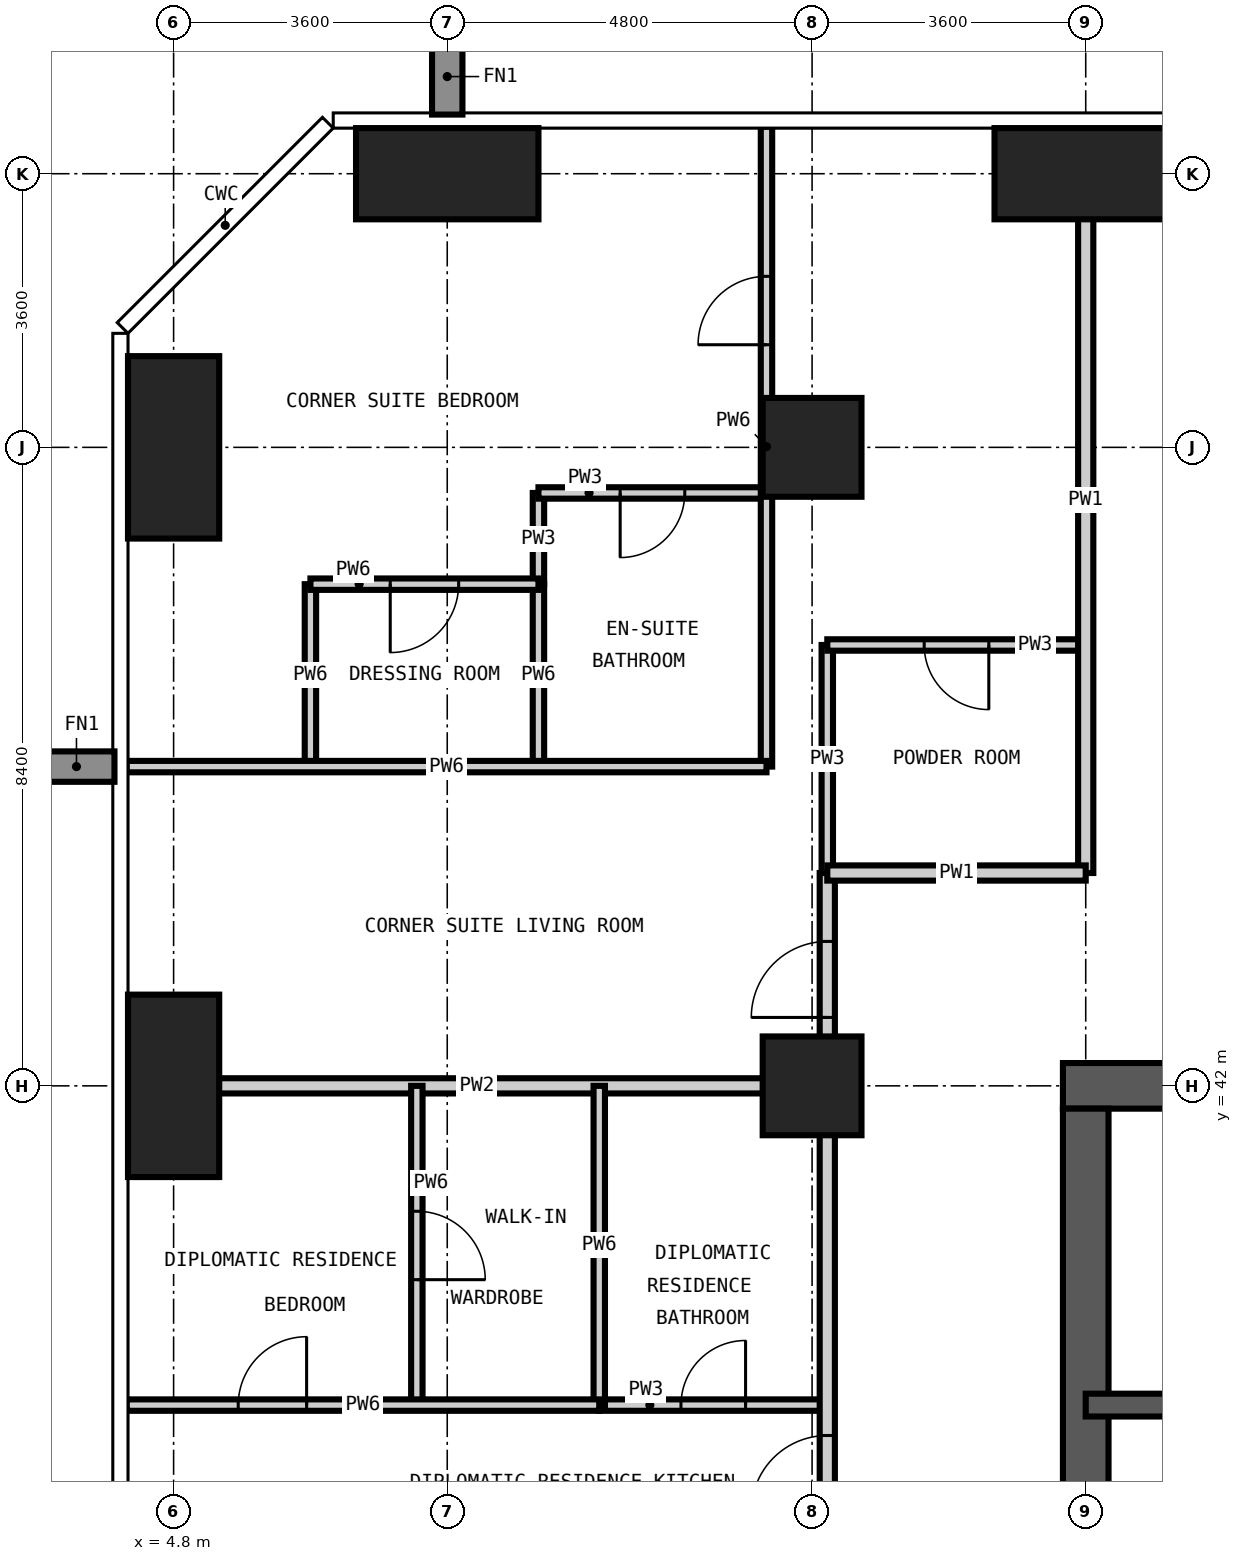
"""IFC4 building model, lengths in metres.
Left out: names, types, materials, properties, quantities, classifications, styles, units other than length and angle.
Written with IfcOpenShell. Run it as: python <this file> out.ifc"""

import sys

from ifc_helpers import new_model, si_unit, direction, frame, frame_2d, origin, origin_2d, place, context, subcontext, project, spatial, rectangle, extrude, element, fill, save


model = new_model("IFC4")
c1 = context("Model", 3, precision=1e-05, world=origin(), true_north=direction((0.0, 1.0)))
c2 = subcontext(c1, "Body", "Model", "MODEL_VIEW")
j1 = project(units=[si_unit("LENGTHUNIT", "METRE"), si_unit("PLANEANGLEUNIT", "RADIAN")], contexts=[c1])
p1 = place(None, origin())
s1 = spatial("IfcSite", under=j1, at=p1, CompositionType="ELEMENT")
p2 = place(p1, origin())
s2 = spatial("IfcBuilding", under=s1, at=p2, CompositionType="ELEMENT")
p3 = place(p2, frame((0.0, 0.0, 198.6)))
s3 = spatial("IfcBuildingStorey", under=s2, at=p3, CompositionType="ELEMENT", Elevation=198.6)
for number, where, z_axis, x_axis in (
    (1, (4.8, 42.0, -0.35), (0.0, 0.0, 1.0), (1.0, 0.0, 0.0)),
    (2, (4.8, 50.4, -0.35), (0.0, 0.0, 1.0), (1.0, 0.0, 0.0)),
):
    element("IfcColumn", number, at=place(p3, frame(where, z_axis=z_axis, x_axis=x_axis)), inside=s3, PredefinedType="COLUMN", context=c2, shape_type="SweptSolid", body=[
        extrude(rectangle(XDim=1.2, YDim=2.4, at=origin_2d()), origin(), (0.0, 0.0, 1.0), 3.6),
    ])
p4 = place(p3, frame((8.4, 54.0, -0.35), z_axis=(0.0, 0.0, 1.0), x_axis=(1.0, 0.0, 0.0)))
e3 = element("IfcColumn", 3, at=p4, inside=s3, PredefinedType="COLUMN", context=c2, shape_type="SweptSolid", body=[
    extrude(rectangle(XDim=2.4, YDim=1.2, at=origin_2d()), origin(), (0.0, 0.0, 1.0), 3.6),
])
for number, where, z_axis, x_axis in (
    (4, (13.2, 42.0, -0.35), (0.0, 0.0, 1.0), (1.0, 0.0, 0.0)),
    (5, (13.2, 50.4, -0.35), (0.0, 0.0, 1.0), (1.0, 0.0, 0.0)),
):
    element("IfcColumn", number, at=place(p3, frame(where, z_axis=z_axis, x_axis=x_axis)), inside=s3, PredefinedType="COLUMN", context=c2, shape_type="SweptSolid", body=[
        extrude(rectangle(XDim=1.3, YDim=1.3, at=origin_2d()), origin(), (0.0, 0.0, 1.0), 3.6),
    ])
p5 = place(p3, frame((16.8, 54.0, -0.35), z_axis=(0.0, 0.0, 1.0), x_axis=(1.0, 0.0, 0.0)))
e6 = element("IfcColumn", 6, at=p5, inside=s3, PredefinedType="COLUMN", context=c2, shape_type="SweptSolid", body=[
    extrude(rectangle(XDim=2.4, YDim=1.2, at=origin_2d()), origin(), (0.0, 0.0, 1.0), 3.6),
])
p6 = place(p3, frame((42.3, 42.0, -0.35), z_axis=(0.0, 0.0, 1.0), x_axis=(-1.0, 0.0, 0.0)))
e7 = element("IfcWall", 7, at=p6, inside=s3, PredefinedType="SHEAR", context=c2, shape_type="SweptSolid", body=[
    extrude(rectangle(XDim=25.8, YDim=0.6, at=frame_2d((12.9, 0.0))), origin(), (0.0, 0.0, 1.0), 3.6),
])
p7 = place(p6, frame((20.8, 0.0, 0.35)))
e8 = element("IfcOpeningElement", 8, at=p7, cuts=e7, PredefinedType="OPENING", context=c2, shape_type="SweptSolid", body=[
    extrude(rectangle(XDim=1.0, YDim=2.1, at=frame_2d((0.5, 1.05))), frame((0.0, 0.31, 0.0), z_axis=(0.0, -1.0, 0.0), x_axis=(1.0, 0.0, 0.0)), (0.0, 0.0, 1.0), 0.62),
])
p8 = place(p6, frame((10.2, 0.0, 0.35)))
e9 = element("IfcOpeningElement", 9, at=p8, cuts=e7, PredefinedType="OPENING", context=c2, shape_type="SweptSolid", body=[
    extrude(rectangle(XDim=1.2, YDim=2.2, at=frame_2d((0.6, 1.1))), frame((0.0, 0.31, 0.0), z_axis=(0.0, -1.0, 0.0), x_axis=(1.0, 0.0, 0.0)), (0.0, 0.0, 1.0), 0.62),
])
p9 = place(p3, frame((16.8, 41.7, -0.35), z_axis=(0.0, 0.0, 1.0), x_axis=(0.0, -1.0, 0.0)))
e10 = element("IfcWall", 10, at=p9, inside=s3, PredefinedType="SHEAR", context=c2, shape_type="SweptSolid", body=[
    extrude(rectangle(XDim=24.6, YDim=0.6, at=frame_2d((12.3, 0.0))), origin(), (0.0, 0.0, 1.0), 3.6),
])
p10 = place(p9, frame((11.4, 0.0, 0.35)))
e11 = element("IfcOpeningElement", 11, at=p10, cuts=e10, PredefinedType="OPENING", context=c2, shape_type="SweptSolid", body=[
    extrude(rectangle(XDim=1.8, YDim=2.2, at=frame_2d((0.9, 1.1))), frame((0.0, 0.31, 0.0), z_axis=(0.0, -1.0, 0.0), x_axis=(1.0, 0.0, 0.0)), (0.0, 0.0, 1.0), 0.62),
])
p11 = place(p9, frame((20.2, 0.0, 0.35)))
e12 = element("IfcOpeningElement", 12, at=p11, cuts=e10, PredefinedType="OPENING", context=c2, shape_type="SweptSolid", body=[
    extrude(rectangle(XDim=1.0, YDim=2.1, at=frame_2d((0.5, 1.05))), frame((0.0, 0.31, 0.0), z_axis=(0.0, -1.0, 0.0), x_axis=(1.0, 0.0, 0.0)), (0.0, 0.0, 1.0), 0.62),
])
p12 = place(p9, frame((5.5, 0.0, 0.35)))
e13 = element("IfcOpeningElement", 13, at=p12, cuts=e10, PredefinedType="OPENING", context=c2, shape_type="SweptSolid", body=[
    extrude(rectangle(XDim=1.0, YDim=2.1, at=frame_2d((0.5, 1.05))), frame((0.0, 0.31, 0.0), z_axis=(0.0, -1.0, 0.0), x_axis=(1.0, 0.0, 0.0)), (0.0, 0.0, 1.0), 0.62),
])
p13 = place(p3, frame((16.8, 37.8, -0.35), z_axis=(0.0, 0.0, 1.0), x_axis=(1.0, 0.0, 0.0)))
e14 = element("IfcWall", 14, at=p13, inside=s3, PredefinedType="SHEAR", context=c2, shape_type="SweptSolid", body=[
    extrude(rectangle(XDim=8.4, YDim=0.3, at=frame_2d((4.2, 0.0))), origin(), (0.0, 0.0, 1.0), 3.6),
])
p14 = place(p3, frame((9.6, 48.6, 0.0), z_axis=(0.0, 0.0, 1.0), x_axis=(0.0, 1.0, 0.0)))
e15 = element("IfcWall", 15, at=p14, inside=s3, PredefinedType="PARTITIONING", context=c2, shape_type="SweptSolid", body=[
    extrude(rectangle(XDim=1.2, YDim=0.15, at=frame_2d((0.6, 0.0))), origin(), (0.0, 0.0, 1.0), 3.25),
])
p15 = place(p3, frame((13.4, 44.8, 0.0), z_axis=(0.0, 0.0, 1.0), x_axis=(0.0, 1.0, 0.0)))
e16 = element("IfcWall", 16, at=p15, inside=s3, PredefinedType="PARTITIONING", context=c2, shape_type="SweptSolid", body=[
    extrude(rectangle(XDim=3.0, YDim=0.15, at=frame_2d((1.5, 0.0))), origin(), (0.0, 0.0, 1.0), 3.25),
])
p16 = place(p3, frame((10.4, 37.8, 0.0), z_axis=(0.0, 0.0, 1.0), x_axis=(1.0, 0.0, 0.0)))
e17 = element("IfcWall", 17, at=p16, inside=s3, PredefinedType="PARTITIONING", context=c2, shape_type="SweptSolid", body=[
    extrude(rectangle(XDim=3.0, YDim=0.15, at=frame_2d((1.5, 0.0))), origin(), (0.0, 0.0, 1.0), 3.25),
])
p17 = place(p16, frame((1.075, 0.0, 0.0)))
e18 = element("IfcOpeningElement", 18, at=p17, cuts=e17, PredefinedType="OPENING", context=c2, shape_type="SweptSolid", body=[
    extrude(rectangle(XDim=0.85, YDim=2.1, at=frame_2d((0.425, 1.05))), frame((0.0, 0.085, 0.0), z_axis=(0.0, -1.0, 0.0), x_axis=(1.0, 0.0, 0.0)), (0.0, 0.0, 1.0), 0.17),
])
p18 = place(p3, frame((13.4, 47.8, 0.0), z_axis=(0.0, 0.0, 1.0), x_axis=(1.0, 0.0, 0.0)))
e19 = element("IfcWall", 19, at=p18, inside=s3, PredefinedType="PARTITIONING", context=c2, shape_type="SweptSolid", body=[
    extrude(rectangle(XDim=3.4, YDim=0.15, at=frame_2d((1.7, 0.0))), origin(), (0.0, 0.0, 1.0), 3.25),
])
p19 = place(p18, frame((1.275, 0.0, 0.0)))
e20 = element("IfcOpeningElement", 20, at=p19, cuts=e19, PredefinedType="OPENING", context=c2, shape_type="SweptSolid", body=[
    extrude(rectangle(XDim=0.85, YDim=2.1, at=frame_2d((0.425, 1.05))), frame((0.0, 0.085, 0.0), z_axis=(0.0, -1.0, 0.0), x_axis=(1.0, 0.0, 0.0)), (0.0, 0.0, 1.0), 0.17),
])
p20 = place(p3, frame((9.6, 49.8, 0.0), z_axis=(0.0, 0.0, 1.0), x_axis=(1.0, 0.0, 0.0)))
e21 = element("IfcWall", 21, at=p20, inside=s3, PredefinedType="PARTITIONING", context=c2, shape_type="SweptSolid", body=[
    extrude(rectangle(XDim=3.0, YDim=0.15, at=frame_2d((1.5, 0.0))), origin(), (0.0, 0.0, 1.0), 3.25),
])
p21 = place(p20, frame((1.075, 0.0, 0.0)))
e22 = element("IfcOpeningElement", 22, at=p21, cuts=e21, PredefinedType="OPENING", context=c2, shape_type="SweptSolid", body=[
    extrude(rectangle(XDim=0.85, YDim=2.1, at=frame_2d((0.425, 1.05))), frame((0.0, 0.085, 0.0), z_axis=(0.0, -1.0, 0.0), x_axis=(1.0, 0.0, 0.0)), (0.0, 0.0, 1.0), 0.17),
])
p22 = place(p3, frame((13.4, 13.4, 0.0), z_axis=(0.0, 0.0, 1.0), x_axis=(0.0, 1.0, 0.0)))
e23 = element("IfcWall", 23, at=p22, inside=s3, PredefinedType="PARTITIONING", context=c2, shape_type="SweptSolid", body=[
    extrude(rectangle(XDim=31.4, YDim=0.2, at=frame_2d((15.7, 0.0))), origin(), (0.0, 0.0, 1.0), 3.25),
])
p23 = place(p22, frame((6.2, 0.0, 0.0)))
e24 = element("IfcOpeningElement", 24, at=p23, cuts=e23, PredefinedType="OPENING", context=c2, shape_type="SweptSolid", body=[
    extrude(rectangle(XDim=1.0, YDim=2.2, at=frame_2d((0.5, 1.1))), frame((0.0, 0.11, 0.0), z_axis=(0.0, -1.0, 0.0), x_axis=(1.0, 0.0, 0.0)), (0.0, 0.0, 1.0), 0.22),
])
p24 = place(p22, frame((14.6, 0.0, 0.0)))
e25 = element("IfcOpeningElement", 25, at=p24, cuts=e23, PredefinedType="OPENING", context=c2, shape_type="SweptSolid", body=[
    extrude(rectangle(XDim=1.0, YDim=2.2, at=frame_2d((0.5, 1.1))), frame((0.0, 0.11, 0.0), z_axis=(0.0, -1.0, 0.0), x_axis=(1.0, 0.0, 0.0)), (0.0, 0.0, 1.0), 0.22),
])
p25 = place(p22, frame((23.0, 0.0, 0.0)))
e26 = element("IfcOpeningElement", 26, at=p25, cuts=e23, PredefinedType="OPENING", context=c2, shape_type="SweptSolid", body=[
    extrude(rectangle(XDim=1.0, YDim=2.2, at=frame_2d((0.5, 1.1))), frame((0.0, 0.11, 0.0), z_axis=(0.0, -1.0, 0.0), x_axis=(1.0, 0.0, 0.0)), (0.0, 0.0, 1.0), 0.22),
])
p26 = place(p22, frame((1.2, 0.0, 0.0)))
e27 = element("IfcOpeningElement", 27, at=p26, cuts=e23, PredefinedType="OPENING", context=c2, shape_type="SweptSolid", body=[
    extrude(rectangle(XDim=1.0, YDim=2.2, at=frame_2d((0.5, 1.1))), frame((0.0, 0.11, 0.0), z_axis=(0.0, -1.0, 0.0), x_axis=(1.0, 0.0, 0.0)), (0.0, 0.0, 1.0), 0.22),
])
p27 = place(p22, frame((29.5, 0.0, 0.0)))
e28 = element("IfcOpeningElement", 28, at=p27, cuts=e23, PredefinedType="OPENING", context=c2, shape_type="SweptSolid", body=[
    extrude(rectangle(XDim=1.0, YDim=2.2, at=frame_2d((0.5, 1.1))), frame((0.0, 0.11, 0.0), z_axis=(0.0, -1.0, 0.0), x_axis=(1.0, 0.0, 0.0)), (0.0, 0.0, 1.0), 0.22),
])
p28 = place(p3, frame((16.8, 44.8, 0.0), z_axis=(0.0, 0.0, 1.0), x_axis=(0.0, 1.0, 0.0)))
e29 = element("IfcWall", 29, at=p28, inside=s3, PredefinedType="PARTITIONING", context=c2, shape_type="SweptSolid", body=[
    extrude(rectangle(XDim=9.818, YDim=0.2, at=frame_2d((4.909, 0.0))), origin(), (0.0, 0.0, 1.0), 3.25),
])
p29 = place(p3, frame((13.4, 44.8, 0.0), z_axis=(0.0, 0.0, 1.0), x_axis=(1.0, 0.0, 0.0)))
e30 = element("IfcWall", 30, at=p29, inside=s3, PredefinedType="PARTITIONING", context=c2, shape_type="SweptSolid", body=[
    extrude(rectangle(XDim=3.4, YDim=0.2, at=frame_2d((1.7, 0.0))), origin(), (0.0, 0.0, 1.0), 3.25),
])
p30 = place(p3, frame((4.182, 42.0, 0.0), z_axis=(0.0, 0.0, 1.0), x_axis=(1.0, 0.0, 0.0)))
e31 = element("IfcWall", 31, at=p30, inside=s3, PredefinedType="PARTITIONING", context=c2, shape_type="SweptSolid", body=[
    extrude(rectangle(XDim=9.218, YDim=0.2, at=frame_2d((4.609, 0.0))), origin(), (0.0, 0.0, 1.0), 3.25),
])
p31 = place(p3, frame((6.6, 46.2, 0.0), z_axis=(0.0, 0.0, 1.0), x_axis=(0.0, 1.0, 0.0)))
e32 = element("IfcWall", 32, at=p31, inside=s3, PredefinedType="PARTITIONING", context=c2, shape_type="SweptSolid", body=[
    extrude(rectangle(XDim=2.4, YDim=0.15, at=frame_2d((1.2, 0.0))), origin(), (0.0, 0.0, 1.0), 3.25),
])
p32 = place(p3, frame((8.0, 37.8, 0.0), z_axis=(0.0, 0.0, 1.0), x_axis=(0.0, 1.0, 0.0)))
e33 = element("IfcWall", 33, at=p32, inside=s3, PredefinedType="PARTITIONING", context=c2, shape_type="SweptSolid", body=[
    extrude(rectangle(XDim=4.2, YDim=0.15, at=frame_2d((2.1, 0.0))), origin(), (0.0, 0.0, 1.0), 3.25),
])
p33 = place(p32, frame((1.65, 0.0, 0.0)))
e34 = element("IfcOpeningElement", 34, at=p33, cuts=e33, PredefinedType="OPENING", context=c2, shape_type="SweptSolid", body=[
    extrude(rectangle(XDim=0.9, YDim=2.1, at=frame_2d((0.45, 1.05))), frame((0.0, 0.085, 0.0), z_axis=(0.0, -1.0, 0.0), x_axis=(1.0, 0.0, 0.0)), (0.0, 0.0, 1.0), 0.17),
])
p34 = place(p3, frame((9.6, 46.2, 0.0), z_axis=(0.0, 0.0, 1.0), x_axis=(0.0, 1.0, 0.0)))
e35 = element("IfcWall", 35, at=p34, inside=s3, PredefinedType="PARTITIONING", context=c2, shape_type="SweptSolid", body=[
    extrude(rectangle(XDim=2.4, YDim=0.15, at=frame_2d((1.2, 0.0))), origin(), (0.0, 0.0, 1.0), 3.25),
])
p35 = place(p3, frame((10.4, 37.8, 0.0), z_axis=(0.0, 0.0, 1.0), x_axis=(0.0, 1.0, 0.0)))
e36 = element("IfcWall", 36, at=p35, inside=s3, PredefinedType="PARTITIONING", context=c2, shape_type="SweptSolid", body=[
    extrude(rectangle(XDim=4.2, YDim=0.15, at=frame_2d((2.1, 0.0))), origin(), (0.0, 0.0, 1.0), 3.25),
])
p36 = place(p3, frame((12.6, 46.2, 0.0), z_axis=(0.0, 0.0, 1.0), x_axis=(0.0, 1.0, 0.0)))
e37 = element("IfcWall", 37, at=p36, inside=s3, PredefinedType="PARTITIONING", context=c2, shape_type="SweptSolid", body=[
    extrude(rectangle(XDim=8.418, YDim=0.15, at=frame_2d((4.209, 0.0))), origin(), (0.0, 0.0, 1.0), 3.25),
])
p37 = place(p36, frame((5.55, 0.0, 0.0)))
e38 = element("IfcOpeningElement", 38, at=p37, cuts=e37, PredefinedType="OPENING", context=c2, shape_type="SweptSolid", body=[
    extrude(rectangle(XDim=0.9, YDim=2.1, at=frame_2d((0.45, 1.05))), frame((0.0, 0.085, 0.0), z_axis=(0.0, -1.0, 0.0), x_axis=(1.0, 0.0, 0.0)), (0.0, 0.0, 1.0), 0.17),
])
p38 = place(p3, frame((4.182, 37.8, 0.0), z_axis=(0.0, 0.0, 1.0), x_axis=(1.0, 0.0, 0.0)))
e39 = element("IfcWall", 39, at=p38, inside=s3, PredefinedType="PARTITIONING", context=c2, shape_type="SweptSolid", body=[
    extrude(rectangle(XDim=6.218, YDim=0.15, at=frame_2d((3.109, 0.0))), origin(), (0.0, 0.0, 1.0), 3.25),
])
p39 = place(p38, frame((1.468, 0.0, 0.0)))
e40 = element("IfcOpeningElement", 40, at=p39, cuts=e39, PredefinedType="OPENING", context=c2, shape_type="SweptSolid", body=[
    extrude(rectangle(XDim=0.9, YDim=2.1, at=frame_2d((0.45, 1.05))), frame((0.0, 0.085, 0.0), z_axis=(0.0, -1.0, 0.0), x_axis=(1.0, 0.0, 0.0)), (0.0, 0.0, 1.0), 0.17),
])
p40 = place(p3, frame((4.182, 46.2, 0.0), z_axis=(0.0, 0.0, 1.0), x_axis=(1.0, 0.0, 0.0)))
e41 = element("IfcWall", 41, at=p40, inside=s3, PredefinedType="PARTITIONING", context=c2, shape_type="SweptSolid", body=[
    extrude(rectangle(XDim=8.418, YDim=0.15, at=frame_2d((4.209, 0.0))), origin(), (0.0, 0.0, 1.0), 3.25),
])
p41 = place(p3, frame((6.6, 48.6, 0.0), z_axis=(0.0, 0.0, 1.0), x_axis=(1.0, 0.0, 0.0)))
e42 = element("IfcWall", 42, at=p41, inside=s3, PredefinedType="PARTITIONING", context=c2, shape_type="SweptSolid", body=[
    extrude(rectangle(XDim=3.0, YDim=0.15, at=frame_2d((1.5, 0.0))), origin(), (0.0, 0.0, 1.0), 3.25),
])
p42 = place(p41, frame((1.05, 0.0, 0.0)))
e43 = element("IfcOpeningElement", 43, at=p42, cuts=e42, PredefinedType="OPENING", context=c2, shape_type="SweptSolid", body=[
    extrude(rectangle(XDim=0.9, YDim=2.1, at=frame_2d((0.45, 1.05))), frame((0.0, 0.085, 0.0), z_axis=(0.0, -1.0, 0.0), x_axis=(1.0, 0.0, 0.0)), (0.0, 0.0, 1.0), 0.17),
])
p43 = place(p25, origin())
e44 = element("IfcDoor", 44, at=p43, inside=s3, OperationType="SINGLE_SWING_LEFT", PredefinedType="DOOR", context=c2, shape_type="SweptSolid", body=[
    extrude(rectangle(XDim=1.0, YDim=2.2, at=frame_2d((0.5, 1.1))), frame((0.0, 0.025, 0.0), z_axis=(0.0, -1.0, 0.0), x_axis=(1.0, 0.0, 0.0)), (0.0, 0.0, 1.0), 0.05),
])
fill(e26, e44)
p44 = place(p17, origin())
e45 = element("IfcDoor", 45, at=p44, inside=s3, OperationType="SINGLE_SWING_RIGHT", PredefinedType="DOOR", context=c2, shape_type="SweptSolid", body=[
    extrude(rectangle(XDim=0.85, YDim=2.1, at=frame_2d((0.425, 1.05))), frame((0.0, 0.025, 0.0), z_axis=(0.0, -1.0, 0.0), x_axis=(1.0, 0.0, 0.0)), (0.0, 0.0, 1.0), 0.05),
])
fill(e18, e45)
p45 = place(p33, frame((0.9, 0.0, 0.0), z_axis=(0.0, 0.0, 1.0), x_axis=(-1.0, 0.0, 0.0)))
e46 = element("IfcDoor", 46, at=p45, inside=s3, OperationType="SINGLE_SWING_RIGHT", PredefinedType="DOOR", context=c2, shape_type="SweptSolid", body=[
    extrude(rectangle(XDim=0.9, YDim=2.1, at=frame_2d((0.45, 1.05))), frame((0.0, 0.025, 0.0), z_axis=(0.0, -1.0, 0.0), x_axis=(1.0, 0.0, 0.0)), (0.0, 0.0, 1.0), 0.05),
])
fill(e34, e46)
p46 = place(p39, origin())
e47 = element("IfcDoor", 47, at=p46, inside=s3, OperationType="SINGLE_SWING_RIGHT", PredefinedType="DOOR", context=c2, shape_type="SweptSolid", body=[
    extrude(rectangle(XDim=0.9, YDim=2.1, at=frame_2d((0.45, 1.05))), frame((0.0, 0.025, 0.0), z_axis=(0.0, -1.0, 0.0), x_axis=(1.0, 0.0, 0.0)), (0.0, 0.0, 1.0), 0.05),
])
fill(e40, e47)
p47 = place(p27, origin())
e48 = element("IfcDoor", 48, at=p47, inside=s3, OperationType="SINGLE_SWING_LEFT", PredefinedType="DOOR", context=c2, shape_type="SweptSolid", body=[
    extrude(rectangle(XDim=1.0, YDim=2.2, at=frame_2d((0.5, 1.1))), frame((0.0, 0.025, 0.0), z_axis=(0.0, -1.0, 0.0), x_axis=(1.0, 0.0, 0.0)), (0.0, 0.0, 1.0), 0.05),
])
fill(e28, e48)
p48 = place(p19, frame((0.85, 0.0, 0.0), z_axis=(0.0, 0.0, 1.0), x_axis=(-1.0, 0.0, 0.0)))
e49 = element("IfcDoor", 49, at=p48, inside=s3, OperationType="SINGLE_SWING_LEFT", PredefinedType="DOOR", context=c2, shape_type="SweptSolid", body=[
    extrude(rectangle(XDim=0.85, YDim=2.1, at=frame_2d((0.425, 1.05))), frame((0.0, 0.025, 0.0), z_axis=(0.0, -1.0, 0.0), x_axis=(1.0, 0.0, 0.0)), (0.0, 0.0, 1.0), 0.05),
])
fill(e20, e49)
p49 = place(p37, origin())
e50 = element("IfcDoor", 50, at=p49, inside=s3, OperationType="SINGLE_SWING_LEFT", PredefinedType="DOOR", context=c2, shape_type="SweptSolid", body=[
    extrude(rectangle(XDim=0.9, YDim=2.1, at=frame_2d((0.45, 1.05))), frame((0.0, 0.025, 0.0), z_axis=(0.0, -1.0, 0.0), x_axis=(1.0, 0.0, 0.0)), (0.0, 0.0, 1.0), 0.05),
])
fill(e38, e50)
p50 = place(p21, frame((0.85, 0.0, 0.0), z_axis=(0.0, 0.0, 1.0), x_axis=(-1.0, 0.0, 0.0)))
e51 = element("IfcDoor", 51, at=p50, inside=s3, OperationType="SINGLE_SWING_RIGHT", PredefinedType="DOOR", context=c2, shape_type="SweptSolid", body=[
    extrude(rectangle(XDim=0.85, YDim=2.1, at=frame_2d((0.425, 1.05))), frame((0.0, 0.025, 0.0), z_axis=(0.0, -1.0, 0.0), x_axis=(1.0, 0.0, 0.0)), (0.0, 0.0, 1.0), 0.05),
])
fill(e22, e51)
p51 = place(p42, frame((0.9, 0.0, 0.0), z_axis=(0.0, 0.0, 1.0), x_axis=(-1.0, 0.0, 0.0)))
e52 = element("IfcDoor", 52, at=p51, inside=s3, OperationType="SINGLE_SWING_RIGHT", PredefinedType="DOOR", context=c2, shape_type="SweptSolid", body=[
    extrude(rectangle(XDim=0.9, YDim=2.1, at=frame_2d((0.45, 1.05))), frame((0.0, 0.025, 0.0), z_axis=(0.0, -1.0, 0.0), x_axis=(1.0, 0.0, 0.0)), (0.0, 0.0, 1.0), 0.05),
])
fill(e43, e52)
save(model, sys.argv[1])
